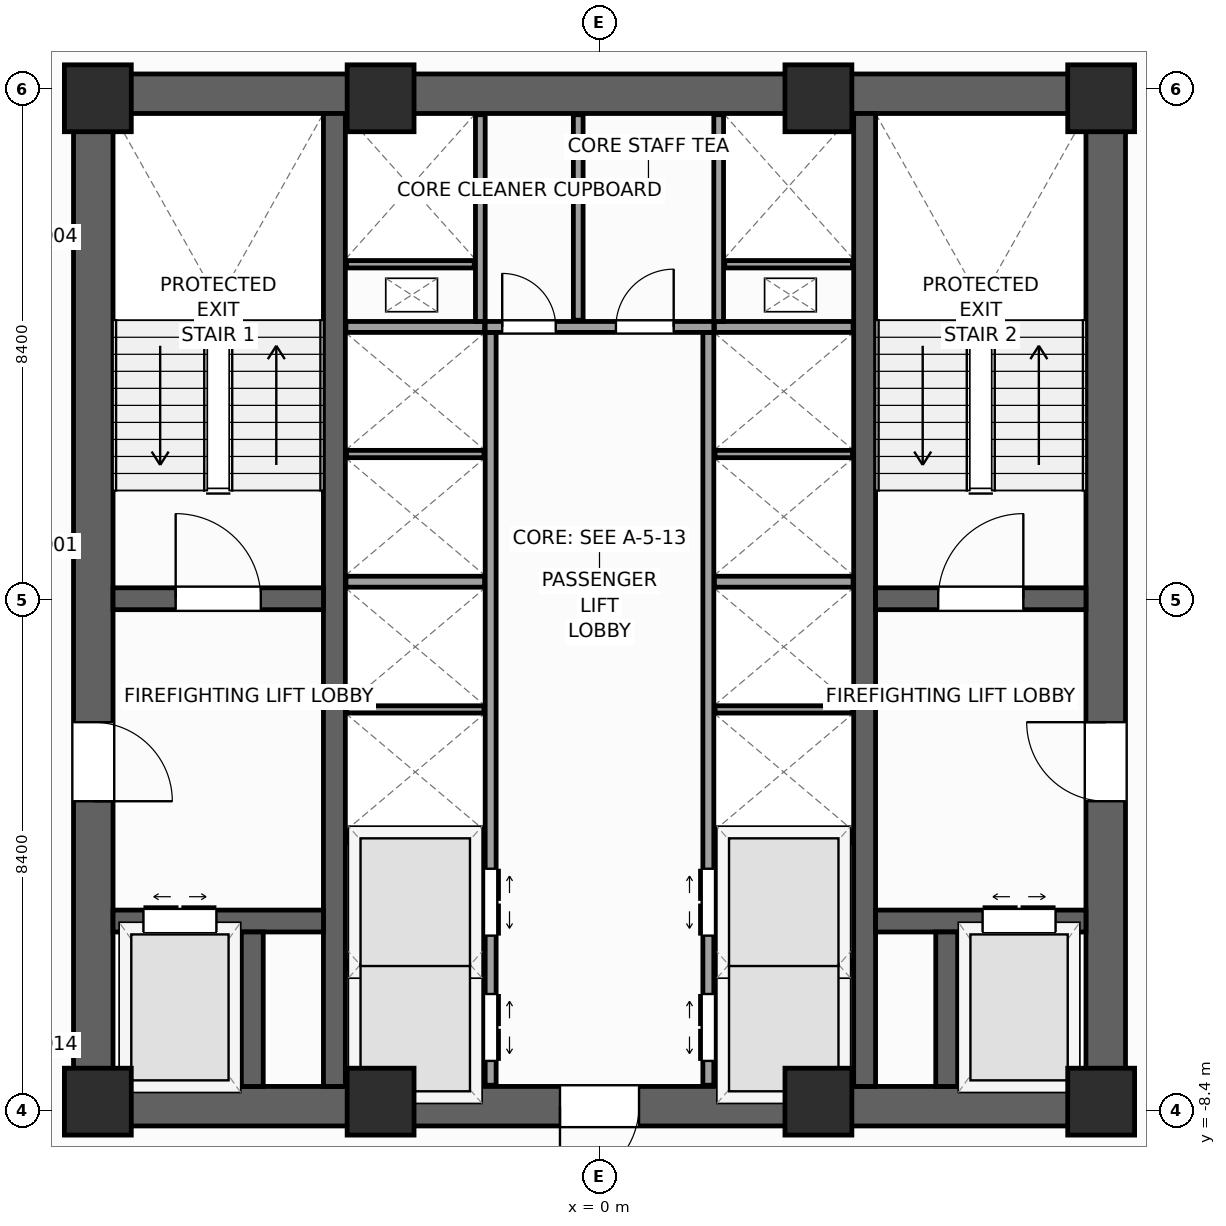
"""IFC4 building model, lengths in metres.
Left out: names, types, materials, properties, quantities, classifications, styles, units other than length and angle.
Written with IfcOpenShell. Run it as: python <this file> out.ifc"""

import sys

from ifc_helpers import new_model, si_unit, direction, frame, frame_2d, origin, origin_2d, place, context, subcontext, project, spatial, rectangle, extrude, source, transform, mapped, element, fill, save


model = new_model("IFC4")
c1 = context("Model", 3, precision=1e-05, world=origin(), true_north=direction((0.0, 1.0)))
c2 = subcontext(c1, "Body", "Model", "MODEL_VIEW")
j1 = project(units=[si_unit("LENGTHUNIT", "METRE"), si_unit("PLANEANGLEUNIT", "RADIAN")], contexts=[c1])
p1 = place(None, origin())
s1 = spatial("IfcSite", under=j1, at=p1, CompositionType="ELEMENT")
p2 = place(p1, origin())
s2 = spatial("IfcBuilding", under=s1, at=p2, CompositionType="ELEMENT")
p3 = place(p2, frame((0.0, 0.0, 127.2)))
s3 = spatial("IfcBuildingStorey", under=s2, at=p3, CompositionType="ELEMENT", Elevation=127.2)
p4 = place(p3, frame((-8.65, -8.325, 0.0), z_axis=(0.0, 0.0, 1.0), x_axis=(1.0, 0.0, 0.0)))
e1 = element("IfcWall", 1, at=p4, inside=s3, PredefinedType="SHEAR", context=c2, shape_type="SweptSolid", body=[
    extrude(rectangle(XDim=17.3, YDim=0.65, at=frame_2d((8.65, 0.0))), origin(), (0.0, 0.0, 1.0), 4.0),
])
p5 = place(p4, frame((8.0, 0.0, 0.0)))
e2 = element("IfcOpeningElement", 2, at=p5, cuts=e1, PredefinedType="OPENING", context=c2, shape_type="SweptSolid", body=[
    extrude(rectangle(XDim=1.3, YDim=2.2, at=frame_2d((0.65, 1.1))), frame((0.0, 0.335, 0.0), z_axis=(0.0, -1.0, 0.0), x_axis=(1.0, 0.0, 0.0)), (0.0, 0.0, 1.0), 0.67),
])
p6 = place(p3, frame((-8.65, 8.325, 0.0), z_axis=(0.0, 0.0, 1.0), x_axis=(1.0, 0.0, 0.0)))
e3 = element("IfcWall", 3, at=p6, inside=s3, PredefinedType="SHEAR", context=c2, shape_type="SweptSolid", body=[
    extrude(rectangle(XDim=17.3, YDim=0.65, at=frame_2d((8.65, 0.0))), origin(), (0.0, 0.0, 1.0), 4.0),
])
p7 = place(p3, frame((-8.325, -8.0, 0.0), z_axis=(0.0, 0.0, 1.0), x_axis=(0.0, 1.0, 0.0)))
e4 = element("IfcWall", 4, at=p7, inside=s3, PredefinedType="SHEAR", context=c2, shape_type="SweptSolid", body=[
    extrude(rectangle(XDim=16.0, YDim=0.65, at=frame_2d((8.0, 0.0))), origin(), (0.0, 0.0, 1.0), 4.0),
])
p8 = place(p7, frame((4.69, 0.0, 0.0)))
e5 = element("IfcOpeningElement", 5, at=p8, cuts=e4, PredefinedType="OPENING", context=c2, shape_type="SweptSolid", body=[
    extrude(rectangle(XDim=1.3, YDim=2.2, at=frame_2d((0.65, 1.1))), frame((0.0, 0.335, 0.0), z_axis=(0.0, -1.0, 0.0), x_axis=(1.0, 0.0, 0.0)), (0.0, 0.0, 1.0), 0.67),
])
p9 = place(p3, frame((8.325, -8.0, 0.0), z_axis=(0.0, 0.0, 1.0), x_axis=(0.0, 1.0, 0.0)))
e6 = element("IfcWall", 6, at=p9, inside=s3, PredefinedType="SHEAR", context=c2, shape_type="SweptSolid", body=[
    extrude(rectangle(XDim=16.0, YDim=0.65, at=frame_2d((8.0, 0.0))), origin(), (0.0, 0.0, 1.0), 4.0),
])
p10 = place(p9, frame((4.69, 0.0, 0.0)))
e7 = element("IfcOpeningElement", 7, at=p10, cuts=e6, PredefinedType="OPENING", context=c2, shape_type="SweptSolid", body=[
    extrude(rectangle(XDim=1.3, YDim=2.2, at=frame_2d((0.65, 1.1))), frame((0.0, 0.335, 0.0), z_axis=(0.0, -1.0, 0.0), x_axis=(1.0, 0.0, 0.0)), (0.0, 0.0, 1.0), 0.67),
])
for number, where, z_axis, x_axis in (
    (8, (-4.36, -8.0, 0.0), (0.0, 0.0, 1.0), (0.0, 1.0, 0.0)),
    (9, (4.36, -8.0, 0.0), (0.0, 0.0, 1.0), (0.0, 1.0, 0.0)),
):
    element("IfcWall", number, at=place(p3, frame(where, z_axis=z_axis, x_axis=x_axis)), inside=s3, PredefinedType="SHEAR", context=c2, shape_type="SweptSolid", body=[
        extrude(rectangle(XDim=16.0, YDim=0.36, at=frame_2d((8.0, 0.0))), origin(), (0.0, 0.0, 1.0), 4.0),
    ])
p11 = place(p3, frame((-8.0, 0.02, 0.0), z_axis=(0.0, 0.0, 1.0), x_axis=(1.0, 0.0, 0.0)))
e10 = element("IfcWall", 10, at=p11, inside=s3, PredefinedType="SHEAR", context=c2, shape_type="SweptSolid", body=[
    extrude(rectangle(XDim=3.46, YDim=0.36, at=frame_2d((1.73, 0.0))), origin(), (0.0, 0.0, 1.0), 4.0),
])
p12 = place(p11, frame((1.03, 0.0, 0.0)))
e11 = element("IfcOpeningElement", 11, at=p12, cuts=e10, PredefinedType="OPENING", context=c2, shape_type="SweptSolid", body=[
    extrude(rectangle(XDim=1.4, YDim=2.2, at=frame_2d((0.7, 1.1))), frame((0.0, 0.19, 0.0), z_axis=(0.0, -1.0, 0.0), x_axis=(1.0, 0.0, 0.0)), (0.0, 0.0, 1.0), 0.38),
])
p13 = place(p3, frame((4.54, 0.02, 0.0), z_axis=(0.0, 0.0, 1.0), x_axis=(1.0, 0.0, 0.0)))
e12 = element("IfcWall", 12, at=p13, inside=s3, PredefinedType="SHEAR", context=c2, shape_type="SweptSolid", body=[
    extrude(rectangle(XDim=3.46, YDim=0.36, at=frame_2d((1.73, 0.0))), origin(), (0.0, 0.0, 1.0), 4.0),
])
p14 = place(p13, frame((1.03, 0.0, 0.0)))
e13 = element("IfcOpeningElement", 13, at=p14, cuts=e12, PredefinedType="OPENING", context=c2, shape_type="SweptSolid", body=[
    extrude(rectangle(XDim=1.4, YDim=2.2, at=frame_2d((0.7, 1.1))), frame((0.0, 0.19, 0.0), z_axis=(0.0, -1.0, 0.0), x_axis=(1.0, 0.0, 0.0)), (0.0, 0.0, 1.0), 0.38),
])
p15 = place(p3, frame((-8.0, -5.28, 0.0), z_axis=(0.0, 0.0, 1.0), x_axis=(1.0, 0.0, 0.0)))
e14 = element("IfcWall", 14, at=p15, inside=s3, PredefinedType="SHEAR", context=c2, shape_type="SweptSolid", body=[
    extrude(rectangle(XDim=3.46, YDim=0.36, at=frame_2d((1.73, 0.0))), origin(), (0.0, 0.0, 1.0), 4.0),
])
p16 = place(p15, frame((0.5, 0.0, 0.0)))
e15 = element("IfcOpeningElement", 15, at=p16, cuts=e14, PredefinedType="OPENING", context=c2, shape_type="SweptSolid", body=[
    extrude(rectangle(XDim=1.2, YDim=2.25, at=frame_2d((0.6, 1.125))), frame((0.0, 0.19, 0.0), z_axis=(0.0, -1.0, 0.0), x_axis=(1.0, 0.0, 0.0)), (0.0, 0.0, 1.0), 0.38),
])
p17 = place(p3, frame((4.54, -5.28, 0.0), z_axis=(0.0, 0.0, 1.0), x_axis=(1.0, 0.0, 0.0)))
e16 = element("IfcWall", 16, at=p17, inside=s3, PredefinedType="SHEAR", context=c2, shape_type="SweptSolid", body=[
    extrude(rectangle(XDim=3.46, YDim=0.36, at=frame_2d((1.73, 0.0))), origin(), (0.0, 0.0, 1.0), 4.0),
])
p18 = place(p17, frame((1.76, 0.0, 0.0)))
e17 = element("IfcOpeningElement", 17, at=p18, cuts=e16, PredefinedType="OPENING", context=c2, shape_type="SweptSolid", body=[
    extrude(rectangle(XDim=1.2, YDim=2.25, at=frame_2d((0.6, 1.125))), frame((0.0, 0.19, 0.0), z_axis=(0.0, -1.0, 0.0), x_axis=(1.0, 0.0, 0.0)), (0.0, 0.0, 1.0), 0.38),
])
for number, where, z_axis, x_axis in (
    (18, (-5.71, -8.0, 0.0), (0.0, 0.0, 1.0), (0.0, 1.0, 0.0)),
    (19, (5.71, -8.0, 0.0), (0.0, 0.0, 1.0), (0.0, 1.0, 0.0)),
):
    element("IfcWall", number, at=place(p3, frame(where, z_axis=z_axis, x_axis=x_axis)), inside=s3, PredefinedType="SHEAR", context=c2, shape_type="SweptSolid", body=[
        extrude(rectangle(XDim=2.54, YDim=0.36, at=frame_2d((1.27, 0.0))), origin(), (0.0, 0.0, 1.0), 4.0),
    ])
m1 = source(origin(), c2, "Body", "SweptSolid", [
    extrude(rectangle(XDim=1.1, YDim=1.1, at=origin_2d()), origin(), (0.0, 0.0, 1.0), 4.0),
])
for number, where, z_axis, x_axis in (
    (20, (-8.25, -8.25, 0.0), (0.0, 0.0, 1.0), (1.0, 0.0, 0.0)),
    (21, (8.25, -8.25, 0.0), (0.0, 0.0, 1.0), (1.0, 0.0, 0.0)),
    (22, (8.25, 8.25, 0.0), (0.0, 0.0, 1.0), (1.0, 0.0, 0.0)),
    (23, (-8.25, 8.25, 0.0), (0.0, 0.0, 1.0), (1.0, 0.0, 0.0)),
    (24, (-3.6, -8.25, 0.0), (0.0, 0.0, 1.0), (1.0, 0.0, 0.0)),
    (25, (3.6, -8.25, 0.0), (0.0, 0.0, 1.0), (1.0, 0.0, 0.0)),
    (26, (-3.6, 8.25, 0.0), (0.0, 0.0, 1.0), (1.0, 0.0, 0.0)),
    (27, (3.6, 8.25, 0.0), (0.0, 0.0, 1.0), (1.0, 0.0, 0.0)),
):
    element("IfcColumn", number, at=place(p3, frame(where, z_axis=z_axis, x_axis=x_axis)), inside=s3, PredefinedType="PILASTER", context=c2, shape_type="MappedRepresentation", body=[
        mapped(m1, transform((0.0, 0.0, 0.0), scale=1.0)),
    ])
p19 = place(p3, frame((-1.79, -7.98, 0.0), z_axis=(0.0, 0.0, 1.0), x_axis=(0.0, 1.0, 0.0)))
e28 = element("IfcWall", 28, at=p19, inside=s3, PredefinedType="PARTITIONING", context=c2, shape_type="SweptSolid", body=[
    extrude(rectangle(XDim=12.38, YDim=0.18, at=frame_2d((6.19, 0.0))), origin(), (0.0, 0.0, 1.0), 3.74),
])
p20 = place(p19, frame((0.4, 0.0, 0.0)))
e29 = element("IfcOpeningElement", 29, at=p20, cuts=e28, PredefinedType="OPENING", context=c2, shape_type="SweptSolid", body=[
    extrude(rectangle(XDim=1.1, YDim=2.2, at=frame_2d((0.55, 1.1))), frame((0.0, 0.1, 0.0), z_axis=(0.0, -1.0, 0.0), x_axis=(1.0, 0.0, 0.0)), (0.0, 0.0, 1.0), 0.2),
])
p21 = place(p19, frame((2.46, 0.0, 0.0)))
e30 = element("IfcOpeningElement", 30, at=p21, cuts=e28, PredefinedType="OPENING", context=c2, shape_type="SweptSolid", body=[
    extrude(rectangle(XDim=1.1, YDim=2.2, at=frame_2d((0.55, 1.1))), frame((0.0, 0.1, 0.0), z_axis=(0.0, -1.0, 0.0), x_axis=(1.0, 0.0, 0.0)), (0.0, 0.0, 1.0), 0.2),
])
p22 = place(p3, frame((1.79, -7.98, 0.0), z_axis=(0.0, 0.0, 1.0), x_axis=(0.0, 1.0, 0.0)))
e31 = element("IfcWall", 31, at=p22, inside=s3, PredefinedType="PARTITIONING", context=c2, shape_type="SweptSolid", body=[
    extrude(rectangle(XDim=12.38, YDim=0.18, at=frame_2d((6.19, 0.0))), origin(), (0.0, 0.0, 1.0), 3.74),
])
p23 = place(p22, frame((0.4, 0.0, 0.0)))
e32 = element("IfcOpeningElement", 32, at=p23, cuts=e31, PredefinedType="OPENING", context=c2, shape_type="SweptSolid", body=[
    extrude(rectangle(XDim=1.1, YDim=2.2, at=frame_2d((0.55, 1.1))), frame((0.0, 0.1, 0.0), z_axis=(0.0, -1.0, 0.0), x_axis=(1.0, 0.0, 0.0)), (0.0, 0.0, 1.0), 0.2),
])
p24 = place(p22, frame((2.46, 0.0, 0.0)))
e33 = element("IfcOpeningElement", 33, at=p24, cuts=e31, PredefinedType="OPENING", context=c2, shape_type="SweptSolid", body=[
    extrude(rectangle(XDim=1.1, YDim=2.2, at=frame_2d((0.55, 1.1))), frame((0.0, 0.1, 0.0), z_axis=(0.0, -1.0, 0.0), x_axis=(1.0, 0.0, 0.0)), (0.0, 0.0, 1.0), 0.2),
])
p25 = place(p3, frame((-1.88, 4.49, 0.0), z_axis=(0.0, 0.0, 1.0), x_axis=(1.0, 0.0, 0.0)))
e34 = element("IfcWall", 34, at=p25, inside=s3, PredefinedType="PARTITIONING", context=c2, shape_type="SweptSolid", body=[
    extrude(rectangle(XDim=3.76, YDim=0.18, at=frame_2d((1.88, 0.0))), origin(), (0.0, 0.0, 1.0), 3.74),
])
p26 = place(p25, frame((0.28, 0.0, 0.0)))
e35 = element("IfcOpeningElement", 35, at=p26, cuts=e34, PredefinedType="OPENING", context=c2, shape_type="SweptSolid", body=[
    extrude(rectangle(XDim=0.88, YDim=2.1, at=frame_2d((0.44, 1.05))), frame((0.0, 0.1, 0.0), z_axis=(0.0, -1.0, 0.0), x_axis=(1.0, 0.0, 0.0)), (0.0, 0.0, 1.0), 0.2),
])
p27 = place(p25, frame((2.15, 0.0, 0.0)))
e36 = element("IfcOpeningElement", 36, at=p27, cuts=e34, PredefinedType="OPENING", context=c2, shape_type="SweptSolid", body=[
    extrude(rectangle(XDim=0.95, YDim=2.1, at=frame_2d((0.475, 1.05))), frame((0.0, 0.1, 0.0), z_axis=(0.0, -1.0, 0.0), x_axis=(1.0, 0.0, 0.0)), (0.0, 0.0, 1.0), 0.2),
])
for number, where, z_axis, x_axis in (
    (37, (-4.17, -3.9, 0.0), (0.0, 0.0, 1.0), (1.0, 0.0, 0.0)),
    (38, (1.89, -3.9, 0.0), (0.0, 0.0, 1.0), (1.0, 0.0, 0.0)),
    (39, (-4.17, 0.3, 0.0), (0.0, 0.0, 1.0), (1.0, 0.0, 0.0)),
    (40, (1.89, 0.3, 0.0), (0.0, 0.0, 1.0), (1.0, 0.0, 0.0)),
    (41, (-4.17, 4.49, 0.0), (0.0, 0.0, 1.0), (1.0, 0.0, 0.0)),
    (42, (1.89, 4.49, 0.0), (0.0, 0.0, 1.0), (1.0, 0.0, 0.0)),
):
    element("IfcWall", number, at=place(p3, frame(where, z_axis=z_axis, x_axis=x_axis)), inside=s3, PredefinedType="PARTITIONING", context=c2, shape_type="SweptSolid", body=[
        extrude(rectangle(XDim=2.28, YDim=0.18, at=frame_2d((1.14, 0.0))), origin(), (0.0, 0.0, 1.0), 3.74),
    ])
for number, where, z_axis, x_axis in (
    (43, (-4.16, -6.0, 0.0), (0.0, 0.0, 1.0), (1.0, 0.0, 0.0)),
    (44, (1.9, -6.0, 0.0), (0.0, 0.0, 1.0), (1.0, 0.0, 0.0)),
    (45, (-4.16, -1.8, 0.0), (0.0, 0.0, 1.0), (1.0, 0.0, 0.0)),
    (46, (1.9, -1.8, 0.0), (0.0, 0.0, 1.0), (1.0, 0.0, 0.0)),
    (47, (-4.16, 2.4, 0.0), (0.0, 0.0, 1.0), (1.0, 0.0, 0.0)),
    (48, (1.9, 2.4, 0.0), (0.0, 0.0, 1.0), (1.0, 0.0, 0.0)),
):
    element("IfcWall", number, at=place(p3, frame(where, z_axis=z_axis, x_axis=x_axis)), inside=s3, PredefinedType="PARTITIONING", context=c2, shape_type="SweptSolid", body=[
        extrude(rectangle(XDim=2.26, YDim=0.12, at=frame_2d((1.13, 0.0))), origin(), (0.0, 0.0, 1.0), 3.74),
    ])
for number, where, z_axis, x_axis in (
    (49, (-1.96, 4.58, 0.0), (0.0, 0.0, 1.0), (0.0, 1.0, 0.0)),
    (50, (1.96, 4.58, 0.0), (0.0, 0.0, 1.0), (0.0, 1.0, 0.0)),
):
    element("IfcWall", number, at=place(p3, frame(where, z_axis=z_axis, x_axis=x_axis)), inside=s3, PredefinedType="PARTITIONING", context=c2, shape_type="SweptSolid", body=[
        extrude(rectangle(XDim=3.4, YDim=0.16, at=frame_2d((1.7, 0.0))), origin(), (0.0, 0.0, 1.0), 3.74),
    ])
for number, where, z_axis, x_axis in (
    (51, (-4.16, 5.52, 0.0), (0.0, 0.0, 1.0), (1.0, 0.0, 0.0)),
    (52, (2.06, 5.52, 0.0), (0.0, 0.0, 1.0), (1.0, 0.0, 0.0)),
):
    element("IfcWall", number, at=place(p3, frame(where, z_axis=z_axis, x_axis=x_axis)), inside=s3, PredefinedType="PARTITIONING", context=c2, shape_type="SweptSolid", body=[
        extrude(rectangle(XDim=2.1, YDim=0.12, at=frame_2d((1.05, 0.0))), origin(), (0.0, 0.0, 1.0), 3.74),
    ])
p28 = place(p3, frame((-0.35, 4.6, 0.0), z_axis=(0.0, 0.0, 1.0), x_axis=(0.0, 1.0, 0.0)))
e53 = element("IfcWall", 53, at=p28, inside=s3, PredefinedType="PARTITIONING", context=c2, shape_type="SweptSolid", body=[
    extrude(rectangle(XDim=3.38, YDim=0.16, at=frame_2d((1.69, 0.0))), origin(), (0.0, 0.0, 1.0), 3.74),
])
m2 = source(origin(), c2, "Body", "SweptSolid", [
    extrude(rectangle(XDim=1.4, YDim=2.2, at=frame_2d((0.7, 1.1))), frame((0.0, 0.025, 0.0), z_axis=(0.0, -1.0, 0.0), x_axis=(1.0, 0.0, 0.0)), (0.0, 0.0, 1.0), 0.05),
])
p29 = place(p12, origin())
e54 = element("IfcDoor", 54, at=p29, inside=s3, OperationType="SINGLE_SWING_LEFT", PredefinedType="DOOR", context=c2, shape_type="MappedRepresentation", body=[
    mapped(m2, transform((0.0, 0.0, 0.0), scale=1.0)),
])
fill(e11, e54)
p30 = place(p14, origin())
e55 = element("IfcDoor", 55, at=p30, inside=s3, OperationType="SINGLE_SWING_RIGHT", PredefinedType="DOOR", context=c2, shape_type="MappedRepresentation", body=[
    mapped(m2, transform((0.0, 0.0, 0.0), scale=1.0)),
])
fill(e13, e55)
m3 = source(origin(), c2, "Body", "SweptSolid", [
    extrude(rectangle(XDim=1.3, YDim=2.2, at=frame_2d((0.65, 1.1))), frame((0.0, 0.025, 0.0), z_axis=(0.0, -1.0, 0.0), x_axis=(1.0, 0.0, 0.0)), (0.0, 0.0, 1.0), 0.05),
])
p31 = place(p8, frame((1.3, 0.0, 0.0), z_axis=(0.0, 0.0, 1.0), x_axis=(-1.0, 0.0, 0.0)))
e56 = element("IfcDoor", 56, at=p31, inside=s3, OperationType="SINGLE_SWING_LEFT", PredefinedType="DOOR", context=c2, shape_type="MappedRepresentation", body=[
    mapped(m3, transform((0.0, 0.0, 0.0), scale=1.0)),
])
fill(e5, e56)
p32 = place(p10, origin())
e57 = element("IfcDoor", 57, at=p32, inside=s3, OperationType="SINGLE_SWING_RIGHT", PredefinedType="DOOR", context=c2, shape_type="MappedRepresentation", body=[
    mapped(m3, transform((0.0, 0.0, 0.0), scale=1.0)),
])
fill(e7, e57)
p33 = place(p5, frame((1.3, 0.0, 0.0), z_axis=(0.0, 0.0, 1.0), x_axis=(-1.0, 0.0, 0.0)))
e58 = element("IfcDoor", 58, at=p33, inside=s3, OperationType="SINGLE_SWING_LEFT", PredefinedType="DOOR", context=c2, shape_type="MappedRepresentation", body=[
    mapped(m3, transform((0.0, 0.0, 0.0), scale=1.0)),
])
fill(e2, e58)
m4 = source(origin(), c2, "Body", "SweptSolid", [
    extrude(rectangle(XDim=1.2, YDim=2.25, at=frame_2d((0.6, 1.125))), frame((0.0, 0.025, 0.0), z_axis=(0.0, -1.0, 0.0), x_axis=(1.0, 0.0, 0.0)), (0.0, 0.0, 1.0), 0.05),
])
p34 = place(p16, origin())
e59 = element("IfcDoor", 59, at=p34, inside=s3, OperationType="DOUBLE_DOOR_SLIDING", PredefinedType="DOOR", context=c2, shape_type="MappedRepresentation", body=[
    mapped(m4, transform((0.0, 0.0, 0.0), scale=1.0)),
])
fill(e15, e59)
p35 = place(p18, origin())
e60 = element("IfcDoor", 60, at=p35, inside=s3, OperationType="DOUBLE_DOOR_SLIDING", PredefinedType="DOOR", context=c2, shape_type="MappedRepresentation", body=[
    mapped(m4, transform((0.0, 0.0, 0.0), scale=1.0)),
])
fill(e17, e60)
m5 = source(origin(), c2, "Body", "SweptSolid", [
    extrude(rectangle(XDim=1.1, YDim=2.2, at=frame_2d((0.55, 1.1))), frame((0.0, 0.025, 0.0), z_axis=(0.0, -1.0, 0.0), x_axis=(1.0, 0.0, 0.0)), (0.0, 0.0, 1.0), 0.05),
])
p36 = place(p20, frame((1.1, 0.0, 0.0), z_axis=(0.0, 0.0, 1.0), x_axis=(-1.0, 0.0, 0.0)))
e61 = element("IfcDoor", 61, at=p36, inside=s3, OperationType="DOUBLE_DOOR_SLIDING", PredefinedType="DOOR", context=c2, shape_type="MappedRepresentation", body=[
    mapped(m5, transform((0.0, 0.0, 0.0), scale=1.0)),
])
fill(e29, e61)
p37 = place(p21, frame((1.1, 0.0, 0.0), z_axis=(0.0, 0.0, 1.0), x_axis=(-1.0, 0.0, 0.0)))
e62 = element("IfcDoor", 62, at=p37, inside=s3, OperationType="DOUBLE_DOOR_SLIDING", PredefinedType="DOOR", context=c2, shape_type="MappedRepresentation", body=[
    mapped(m5, transform((0.0, 0.0, 0.0), scale=1.0)),
])
fill(e30, e62)
p38 = place(p23, origin())
e63 = element("IfcDoor", 63, at=p38, inside=s3, OperationType="DOUBLE_DOOR_SLIDING", PredefinedType="DOOR", context=c2, shape_type="MappedRepresentation", body=[
    mapped(m5, transform((0.0, 0.0, 0.0), scale=1.0)),
])
fill(e32, e63)
p39 = place(p24, origin())
e64 = element("IfcDoor", 64, at=p39, inside=s3, OperationType="DOUBLE_DOOR_SLIDING", PredefinedType="DOOR", context=c2, shape_type="MappedRepresentation", body=[
    mapped(m5, transform((0.0, 0.0, 0.0), scale=1.0)),
])
fill(e33, e64)
m6 = source(origin(), c2, "Body", "SweptSolid", [
    extrude(rectangle(XDim=0.88, YDim=2.1, at=frame_2d((0.44, 1.05))), frame((0.0, 0.025, 0.0), z_axis=(0.0, -1.0, 0.0), x_axis=(1.0, 0.0, 0.0)), (0.0, 0.0, 1.0), 0.05),
])
p40 = place(p26, origin())
e65 = element("IfcDoor", 65, at=p40, inside=s3, OperationType="SINGLE_SWING_LEFT", PredefinedType="DOOR", context=c2, shape_type="MappedRepresentation", body=[
    mapped(m6, transform((0.0, 0.0, 0.0), scale=1.0)),
])
fill(e35, e65)
m7 = source(origin(), c2, "Body", "SweptSolid", [
    extrude(rectangle(XDim=0.95, YDim=2.1, at=frame_2d((0.475, 1.05))), frame((0.0, 0.025, 0.0), z_axis=(0.0, -1.0, 0.0), x_axis=(1.0, 0.0, 0.0)), (0.0, 0.0, 1.0), 0.05),
])
p41 = place(p27, origin())
e66 = element("IfcDoor", 66, at=p41, inside=s3, OperationType="SINGLE_SWING_RIGHT", PredefinedType="DOOR", context=c2, shape_type="MappedRepresentation", body=[
    mapped(m7, transform((0.0, 0.0, 0.0), scale=1.0)),
])
fill(e36, e66)
save(model, sys.argv[1])
